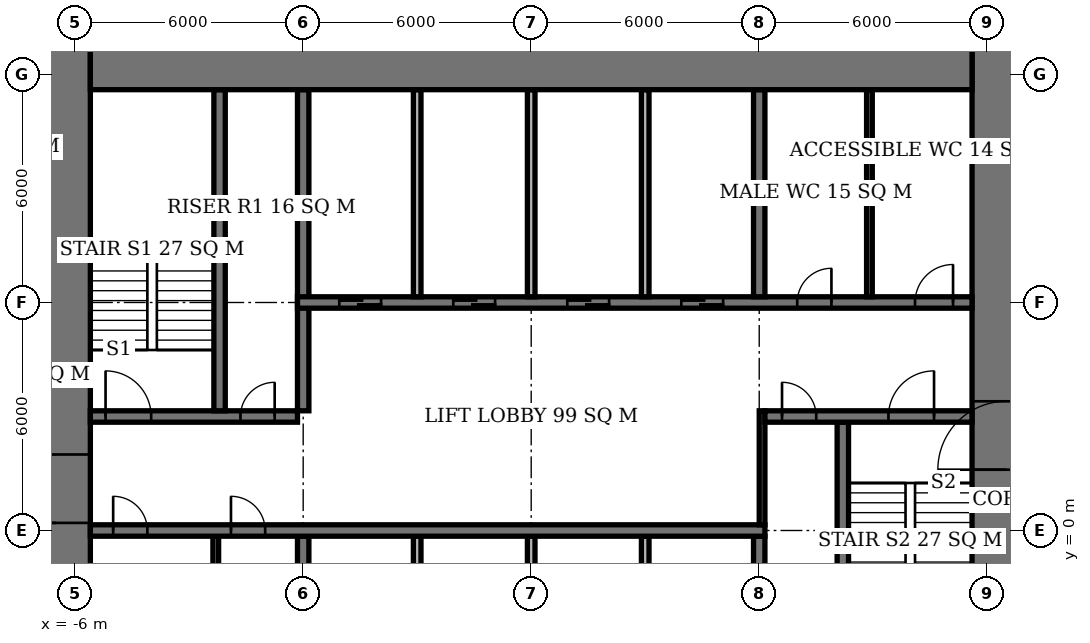
"""IFC4 building model, lengths in metres.
Left out: names, types, materials, properties, quantities, classifications, styles, units other than length and angle.
Written with IfcOpenShell. Run it as: python <this file> out.ifc"""

import sys

from ifc_helpers import new_model, si_unit, direction, frame, frame_2d, origin, place, context, subcontext, project, spatial, rectangle, extrude, element, fill, save


model = new_model("IFC4")
c1 = context("Model", 3, precision=1e-05, world=origin(), true_north=direction((0.0, 1.0)))
c2 = subcontext(c1, "Body", "Model", "MODEL_VIEW")
j1 = project(units=[si_unit("LENGTHUNIT", "METRE"), si_unit("PLANEANGLEUNIT", "RADIAN")], contexts=[c1])
p1 = place(None, origin())
s1 = spatial("IfcSite", under=j1, at=p1, CompositionType="ELEMENT")
p2 = place(p1, origin())
s2 = spatial("IfcBuilding", under=s1, at=p2, CompositionType="ELEMENT")
p3 = place(p2, frame((0.0, 0.0, 57.2)))
s3 = spatial("IfcBuildingStorey", under=s2, at=p3, CompositionType="ELEMENT", Elevation=57.2)
p4 = place(p3, frame((-5.6, 12.6, 0.0), z_axis=(0.0, 0.0, 1.0), x_axis=(1.0, 0.0, 0.0)))
e1 = element("IfcWall", 1, at=p4, inside=s3, PredefinedType="SHEAR", context=c2, shape_type="SweptSolid", body=[
    extrude(rectangle(XDim=23.2, YDim=2.0, at=frame_2d((11.6, 0.0))), origin(), (0.0, 0.0, 1.0), 3.9),
])
p5 = place(p3, frame((-6.5, -7.6, 0.0), z_axis=(0.0, 0.0, 1.0), x_axis=(0.0, 1.0, 0.0)))
e2 = element("IfcWall", 2, at=p5, inside=s3, PredefinedType="SHEAR", context=c2, shape_type="SweptSolid", body=[
    extrude(rectangle(XDim=21.2, YDim=1.8, at=frame_2d((10.6, 0.0))), origin(), (0.0, 0.0, 1.0), 3.9),
])
p6 = place(p5, frame((7.8, 0.0, 0.0)))
e3 = element("IfcOpeningElement", 3, at=p6, cuts=e2, PredefinedType="OPENING", context=c2, shape_type="SweptSolid", body=[
    extrude(rectangle(XDim=1.8, YDim=2.4, at=frame_2d((0.9, 1.2))), frame((0.0, 0.91, 0.0), z_axis=(0.0, -1.0, 0.0), x_axis=(1.0, 0.0, 0.0)), (0.0, 0.0, 1.0), 1.82),
])
p7 = place(p3, frame((18.5, -7.6, 0.0), z_axis=(0.0, 0.0, 1.0), x_axis=(0.0, 1.0, 0.0)))
e4 = element("IfcWall", 4, at=p7, inside=s3, PredefinedType="SHEAR", context=c2, shape_type="SweptSolid", body=[
    extrude(rectangle(XDim=21.2, YDim=1.8, at=frame_2d((10.6, 0.0))), origin(), (0.0, 0.0, 1.0), 3.9),
])
p8 = place(p7, frame((9.2, 0.0, 0.0)))
e5 = element("IfcOpeningElement", 5, at=p8, cuts=e4, PredefinedType="OPENING", context=c2, shape_type="SweptSolid", body=[
    extrude(rectangle(XDim=1.8, YDim=2.4, at=frame_2d((0.9, 1.2))), frame((0.0, 0.91, 0.0), z_axis=(0.0, -1.0, 0.0), x_axis=(1.0, 0.0, 0.0)), (0.0, 0.0, 1.0), 1.82),
])
p9 = place(p3, frame((-5.6, 0.0, 0.0), z_axis=(0.0, 0.0, 1.0), x_axis=(1.0, 0.0, 0.0)))
e6 = element("IfcWall", 6, at=p9, inside=s3, PredefinedType="SHEAR", context=c2, shape_type="SweptSolid", body=[
    extrude(rectangle(XDim=17.75, YDim=0.3, at=frame_2d((8.875, 0.0))), origin(), (0.0, 0.0, 1.0), 3.9),
])
p10 = place(p9, frame((0.6, 0.0, 0.0)))
e7 = element("IfcOpeningElement", 7, at=p10, cuts=e6, PredefinedType="OPENING", context=c2, shape_type="SweptSolid", body=[
    extrude(rectangle(XDim=0.9, YDim=2.1, at=frame_2d((0.45, 1.05))), frame((0.0, 0.16, 0.0), z_axis=(0.0, -1.0, 0.0), x_axis=(1.0, 0.0, 0.0)), (0.0, 0.0, 1.0), 0.32),
])
p11 = place(p9, frame((3.7, 0.0, 0.0)))
e8 = element("IfcOpeningElement", 8, at=p11, cuts=e6, PredefinedType="OPENING", context=c2, shape_type="SweptSolid", body=[
    extrude(rectangle(XDim=0.9, YDim=2.1, at=frame_2d((0.45, 1.05))), frame((0.0, 0.16, 0.0), z_axis=(0.0, -1.0, 0.0), x_axis=(1.0, 0.0, 0.0)), (0.0, 0.0, 1.0), 0.32),
])
p12 = place(p3, frame((-5.6, 3.0, 0.0), z_axis=(0.0, 0.0, 1.0), x_axis=(1.0, 0.0, 0.0)))
e9 = element("IfcWall", 9, at=p12, inside=s3, PredefinedType="SHEAR", context=c2, shape_type="SweptSolid", body=[
    extrude(rectangle(XDim=5.45, YDim=0.3, at=frame_2d((2.725, 0.0))), origin(), (0.0, 0.0, 1.0), 3.9),
])
p13 = place(p12, frame((0.4, 0.0, 0.0)))
e10 = element("IfcOpeningElement", 10, at=p13, cuts=e9, PredefinedType="OPENING", context=c2, shape_type="SweptSolid", body=[
    extrude(rectangle(XDim=1.2, YDim=2.1, at=frame_2d((0.6, 1.05))), frame((0.0, 0.16, 0.0), z_axis=(0.0, -1.0, 0.0), x_axis=(1.0, 0.0, 0.0)), (0.0, 0.0, 1.0), 0.32),
])
p14 = place(p12, frame((3.95, 0.0, 0.0)))
e11 = element("IfcOpeningElement", 11, at=p14, cuts=e9, PredefinedType="OPENING", context=c2, shape_type="SweptSolid", body=[
    extrude(rectangle(XDim=0.9, YDim=2.1, at=frame_2d((0.45, 1.05))), frame((0.0, 0.16, 0.0), z_axis=(0.0, -1.0, 0.0), x_axis=(1.0, 0.0, 0.0)), (0.0, 0.0, 1.0), 0.32),
])
p15 = place(p3, frame((12.15, 3.0, 0.0), z_axis=(0.0, 0.0, 1.0), x_axis=(1.0, 0.0, 0.0)))
e12 = element("IfcWall", 12, at=p15, inside=s3, PredefinedType="SHEAR", context=c2, shape_type="SweptSolid", body=[
    extrude(rectangle(XDim=5.45, YDim=0.3, at=frame_2d((2.725, 0.0))), origin(), (0.0, 0.0, 1.0), 3.9),
])
p16 = place(p15, frame((3.25, 0.0, 0.0)))
e13 = element("IfcOpeningElement", 13, at=p16, cuts=e12, PredefinedType="OPENING", context=c2, shape_type="SweptSolid", body=[
    extrude(rectangle(XDim=1.2, YDim=2.1, at=frame_2d((0.6, 1.05))), frame((0.0, 0.16, 0.0), z_axis=(0.0, -1.0, 0.0), x_axis=(1.0, 0.0, 0.0)), (0.0, 0.0, 1.0), 0.32),
])
p17 = place(p15, frame((0.45, 0.0, 0.0)))
e14 = element("IfcOpeningElement", 14, at=p17, cuts=e12, PredefinedType="OPENING", context=c2, shape_type="SweptSolid", body=[
    extrude(rectangle(XDim=0.9, YDim=2.1, at=frame_2d((0.45, 1.05))), frame((0.0, 0.16, 0.0), z_axis=(0.0, -1.0, 0.0), x_axis=(1.0, 0.0, 0.0)), (0.0, 0.0, 1.0), 0.32),
])
p18 = place(p3, frame((-0.15, 6.0, 0.0), z_axis=(0.0, 0.0, 1.0), x_axis=(1.0, 0.0, 0.0)))
e15 = element("IfcWall", 15, at=p18, inside=s3, PredefinedType="SHEAR", context=c2, shape_type="SweptSolid", body=[
    extrude(rectangle(XDim=17.75, YDim=0.3, at=frame_2d((8.875, 0.0))), origin(), (0.0, 0.0, 1.0), 3.9),
])
p19 = place(p18, frame((13.15, 0.0, 0.0)))
e16 = element("IfcOpeningElement", 16, at=p19, cuts=e15, PredefinedType="OPENING", context=c2, shape_type="SweptSolid", body=[
    extrude(rectangle(XDim=0.9, YDim=2.1, at=frame_2d((0.45, 1.05))), frame((0.0, 0.16, 0.0), z_axis=(0.0, -1.0, 0.0), x_axis=(1.0, 0.0, 0.0)), (0.0, 0.0, 1.0), 0.32),
])
p20 = place(p18, frame((16.25, 0.0, 0.0)))
e17 = element("IfcOpeningElement", 17, at=p20, cuts=e15, PredefinedType="OPENING", context=c2, shape_type="SweptSolid", body=[
    extrude(rectangle(XDim=1.0, YDim=2.1, at=frame_2d((0.5, 1.05))), frame((0.0, 0.16, 0.0), z_axis=(0.0, -1.0, 0.0), x_axis=(1.0, 0.0, 0.0)), (0.0, 0.0, 1.0), 0.32),
])
p21 = place(p18, frame((1.1, 0.0, 0.0)))
e18 = element("IfcOpeningElement", 18, at=p21, cuts=e15, PredefinedType="OPENING", context=c2, shape_type="SweptSolid", body=[
    extrude(rectangle(XDim=1.1, YDim=2.1, at=frame_2d((0.55, 1.05))), frame((0.0, 0.16, 0.0), z_axis=(0.0, -1.0, 0.0), x_axis=(1.0, 0.0, 0.0)), (0.0, 0.0, 1.0), 0.32),
])
p22 = place(p18, frame((4.1, 0.0, 0.0)))
e19 = element("IfcOpeningElement", 19, at=p22, cuts=e15, PredefinedType="OPENING", context=c2, shape_type="SweptSolid", body=[
    extrude(rectangle(XDim=1.1, YDim=2.1, at=frame_2d((0.55, 1.05))), frame((0.0, 0.16, 0.0), z_axis=(0.0, -1.0, 0.0), x_axis=(1.0, 0.0, 0.0)), (0.0, 0.0, 1.0), 0.32),
])
p23 = place(p18, frame((7.1, 0.0, 0.0)))
e20 = element("IfcOpeningElement", 20, at=p23, cuts=e15, PredefinedType="OPENING", context=c2, shape_type="SweptSolid", body=[
    extrude(rectangle(XDim=1.1, YDim=2.1, at=frame_2d((0.55, 1.05))), frame((0.0, 0.16, 0.0), z_axis=(0.0, -1.0, 0.0), x_axis=(1.0, 0.0, 0.0)), (0.0, 0.0, 1.0), 0.32),
])
p24 = place(p18, frame((10.1, 0.0, 0.0)))
e21 = element("IfcOpeningElement", 21, at=p24, cuts=e15, PredefinedType="OPENING", context=c2, shape_type="SweptSolid", body=[
    extrude(rectangle(XDim=1.1, YDim=2.1, at=frame_2d((0.55, 1.05))), frame((0.0, 0.16, 0.0), z_axis=(0.0, -1.0, 0.0), x_axis=(1.0, 0.0, 0.0)), (0.0, 0.0, 1.0), 0.32),
])
p25 = place(p3, frame((0.0, -5.6, 0.0), z_axis=(0.0, 0.0, 1.0), x_axis=(0.0, 1.0, 0.0)))
e22 = element("IfcWall", 22, at=p25, inside=s3, PredefinedType="SHEAR", context=c2, shape_type="SweptSolid", body=[
    extrude(rectangle(XDim=5.45, YDim=0.3, at=frame_2d((2.725, 0.0))), origin(), (0.0, 0.0, 1.0), 3.9),
])
p26 = place(p3, frame((0.0, 3.15, 0.0), z_axis=(0.0, 0.0, 1.0), x_axis=(0.0, 1.0, 0.0)))
e23 = element("IfcWall", 23, at=p26, inside=s3, PredefinedType="SHEAR", context=c2, shape_type="SweptSolid", body=[
    extrude(rectangle(XDim=8.45, YDim=0.3, at=frame_2d((4.225, 0.0))), origin(), (0.0, 0.0, 1.0), 3.9),
])
for number, where, z_axis, x_axis in (
    (24, (12.0, -5.6, 0.0), (0.0, 0.0, 1.0), (0.0, 1.0, 0.0)),
    (25, (12.0, 6.15, 0.0), (0.0, 0.0, 1.0), (0.0, 1.0, 0.0)),
):
    element("IfcWall", number, at=place(p3, frame(where, z_axis=z_axis, x_axis=x_axis)), inside=s3, PredefinedType="SHEAR", context=c2, shape_type="SweptSolid", body=[
        extrude(rectangle(XDim=5.45, YDim=0.3, at=frame_2d((2.725, 0.0))), origin(), (0.0, 0.0, 1.0), 3.9),
    ])
for number, where, z_axis, x_axis in (
    (26, (-2.2, 3.15, 0.0), (0.0, 0.0, 1.0), (0.0, 1.0, 0.0)),
    (27, (14.2, -5.6, 0.0), (0.0, 0.0, 1.0), (0.0, 1.0, 0.0)),
):
    element("IfcWall", number, at=place(p3, frame(where, z_axis=z_axis, x_axis=x_axis)), inside=s3, PredefinedType="SHEAR", context=c2, shape_type="SweptSolid", body=[
        extrude(rectangle(XDim=8.45, YDim=0.3, at=frame_2d((4.225, 0.0))), origin(), (0.0, 0.0, 1.0), 3.9),
    ])
for number, where, z_axis, x_axis in (
    (28, (3.0, 6.15, 0.0), (0.0, 0.0, 1.0), (0.0, 1.0, 0.0)),
    (29, (6.0, 6.15, 0.0), (0.0, 0.0, 1.0), (0.0, 1.0, 0.0)),
    (30, (9.0, 6.15, 0.0), (0.0, 0.0, 1.0), (0.0, 1.0, 0.0)),
    (31, (3.0, -5.6, 0.0), (0.0, 0.0, 1.0), (0.0, 1.0, 0.0)),
    (32, (6.0, -5.6, 0.0), (0.0, 0.0, 1.0), (0.0, 1.0, 0.0)),
    (33, (9.0, -5.6, 0.0), (0.0, 0.0, 1.0), (0.0, 1.0, 0.0)),
):
    element("IfcWall", number, at=place(p3, frame(where, z_axis=z_axis, x_axis=x_axis)), inside=s3, PredefinedType="SOLIDWALL", context=c2, shape_type="SweptSolid", body=[
        extrude(rectangle(XDim=5.45, YDim=0.2, at=frame_2d((2.725, 0.0))), origin(), (0.0, 0.0, 1.0), 3.9),
    ])
for number, where, z_axis, x_axis in (
    (34, (-2.3, -5.6, 0.0), (0.0, 0.0, 1.0), (0.0, 1.0, 0.0)),
    (35, (14.9, 6.15, 0.0), (0.0, 0.0, 1.0), (0.0, 1.0, 0.0)),
):
    element("IfcWall", number, at=place(p3, frame(where, z_axis=z_axis, x_axis=x_axis)), inside=s3, PredefinedType="PLUMBINGWALL", context=c2, shape_type="SweptSolid", body=[
        extrude(rectangle(XDim=5.45, YDim=0.15, at=frame_2d((2.725, 0.0))), origin(), (0.0, 0.0, 1.0), 3.65),
    ])
p27 = place(p3, frame((12.075, 0.15, 0.0), z_axis=(0.0, 0.0, 1.0), x_axis=(0.0, 1.0, 0.0)))
e36 = element("IfcWall", 36, at=p27, inside=s3, PredefinedType="PARTITIONING", context=c2, shape_type="SweptSolid", body=[
    extrude(rectangle(XDim=3.0, YDim=0.15, at=frame_2d((1.5, 0.0))), origin(), (0.0, 0.0, 1.0), 3.65),
])
p28 = place(p6, origin())
e37 = element("IfcDoor", 37, at=p28, inside=s3, OperationType="DOUBLE_DOOR_SINGLE_SWING", PredefinedType="DOOR", context=c2, shape_type="SweptSolid", body=[
    extrude(rectangle(XDim=1.8, YDim=2.4, at=frame_2d((0.9, 1.2))), frame((0.0, 0.025, 0.0), z_axis=(0.0, -1.0, 0.0), x_axis=(1.0, 0.0, 0.0)), (0.0, 0.0, 1.0), 0.05),
])
fill(e3, e37)
p29 = place(p8, origin())
e38 = element("IfcDoor", 38, at=p29, inside=s3, OperationType="DOUBLE_DOOR_SINGLE_SWING", PredefinedType="DOOR", context=c2, shape_type="SweptSolid", body=[
    extrude(rectangle(XDim=1.8, YDim=2.4, at=frame_2d((0.9, 1.2))), frame((0.0, 0.025, 0.0), z_axis=(0.0, -1.0, 0.0), x_axis=(1.0, 0.0, 0.0)), (0.0, 0.0, 1.0), 0.05),
])
fill(e5, e38)
p30 = place(p13, origin())
e39 = element("IfcDoor", 39, at=p30, inside=s3, OperationType="SINGLE_SWING_LEFT", PredefinedType="DOOR", context=c2, shape_type="SweptSolid", body=[
    extrude(rectangle(XDim=1.2, YDim=2.1, at=frame_2d((0.6, 1.05))), frame((0.0, 0.025, 0.0), z_axis=(0.0, -1.0, 0.0), x_axis=(1.0, 0.0, 0.0)), (0.0, 0.0, 1.0), 0.05),
])
fill(e10, e39)
p31 = place(p14, origin())
e40 = element("IfcDoor", 40, at=p31, inside=s3, OperationType="SINGLE_SWING_RIGHT", PredefinedType="DOOR", context=c2, shape_type="SweptSolid", body=[
    extrude(rectangle(XDim=0.9, YDim=2.1, at=frame_2d((0.45, 1.05))), frame((0.0, 0.025, 0.0), z_axis=(0.0, -1.0, 0.0), x_axis=(1.0, 0.0, 0.0)), (0.0, 0.0, 1.0), 0.05),
])
fill(e11, e40)
p32 = place(p16, origin())
e41 = element("IfcDoor", 41, at=p32, inside=s3, OperationType="SINGLE_SWING_RIGHT", PredefinedType="DOOR", context=c2, shape_type="SweptSolid", body=[
    extrude(rectangle(XDim=1.2, YDim=2.1, at=frame_2d((0.6, 1.05))), frame((0.0, 0.025, 0.0), z_axis=(0.0, -1.0, 0.0), x_axis=(1.0, 0.0, 0.0)), (0.0, 0.0, 1.0), 0.05),
])
fill(e13, e41)
p33 = place(p17, origin())
e42 = element("IfcDoor", 42, at=p33, inside=s3, OperationType="SINGLE_SWING_LEFT", PredefinedType="DOOR", context=c2, shape_type="SweptSolid", body=[
    extrude(rectangle(XDim=0.9, YDim=2.1, at=frame_2d((0.45, 1.05))), frame((0.0, 0.025, 0.0), z_axis=(0.0, -1.0, 0.0), x_axis=(1.0, 0.0, 0.0)), (0.0, 0.0, 1.0), 0.05),
])
fill(e14, e42)
p34 = place(p10, origin())
e43 = element("IfcDoor", 43, at=p34, inside=s3, OperationType="SINGLE_SWING_LEFT", PredefinedType="DOOR", context=c2, shape_type="SweptSolid", body=[
    extrude(rectangle(XDim=0.9, YDim=2.1, at=frame_2d((0.45, 1.05))), frame((0.0, 0.025, 0.0), z_axis=(0.0, -1.0, 0.0), x_axis=(1.0, 0.0, 0.0)), (0.0, 0.0, 1.0), 0.05),
])
fill(e7, e43)
p35 = place(p11, origin())
e44 = element("IfcDoor", 44, at=p35, inside=s3, OperationType="SINGLE_SWING_LEFT", PredefinedType="DOOR", context=c2, shape_type="SweptSolid", body=[
    extrude(rectangle(XDim=0.9, YDim=2.1, at=frame_2d((0.45, 1.05))), frame((0.0, 0.025, 0.0), z_axis=(0.0, -1.0, 0.0), x_axis=(1.0, 0.0, 0.0)), (0.0, 0.0, 1.0), 0.05),
])
fill(e8, e44)
p36 = place(p19, origin())
e45 = element("IfcDoor", 45, at=p36, inside=s3, OperationType="SINGLE_SWING_RIGHT", PredefinedType="DOOR", context=c2, shape_type="SweptSolid", body=[
    extrude(rectangle(XDim=0.9, YDim=2.1, at=frame_2d((0.45, 1.05))), frame((0.0, 0.025, 0.0), z_axis=(0.0, -1.0, 0.0), x_axis=(1.0, 0.0, 0.0)), (0.0, 0.0, 1.0), 0.05),
])
fill(e16, e45)
p37 = place(p20, origin())
e46 = element("IfcDoor", 46, at=p37, inside=s3, OperationType="SINGLE_SWING_RIGHT", PredefinedType="DOOR", context=c2, shape_type="SweptSolid", body=[
    extrude(rectangle(XDim=1.0, YDim=2.1, at=frame_2d((0.5, 1.05))), frame((0.0, 0.025, 0.0), z_axis=(0.0, -1.0, 0.0), x_axis=(1.0, 0.0, 0.0)), (0.0, 0.0, 1.0), 0.05),
])
fill(e17, e46)
p38 = place(p21, origin())
e47 = element("IfcDoor", 47, at=p38, inside=s3, OperationType="DOUBLE_DOOR_SLIDING", PredefinedType="USERDEFINED", context=c2, shape_type="SweptSolid", body=[
    extrude(rectangle(XDim=1.1, YDim=2.1, at=frame_2d((0.55, 1.05))), frame((0.0, 0.025, 0.0), z_axis=(0.0, -1.0, 0.0), x_axis=(1.0, 0.0, 0.0)), (0.0, 0.0, 1.0), 0.05),
])
fill(e18, e47)
p39 = place(p22, origin())
e48 = element("IfcDoor", 48, at=p39, inside=s3, OperationType="DOUBLE_DOOR_SLIDING", PredefinedType="USERDEFINED", context=c2, shape_type="SweptSolid", body=[
    extrude(rectangle(XDim=1.1, YDim=2.1, at=frame_2d((0.55, 1.05))), frame((0.0, 0.025, 0.0), z_axis=(0.0, -1.0, 0.0), x_axis=(1.0, 0.0, 0.0)), (0.0, 0.0, 1.0), 0.05),
])
fill(e19, e48)
p40 = place(p23, origin())
e49 = element("IfcDoor", 49, at=p40, inside=s3, OperationType="DOUBLE_DOOR_SLIDING", PredefinedType="USERDEFINED", context=c2, shape_type="SweptSolid", body=[
    extrude(rectangle(XDim=1.1, YDim=2.1, at=frame_2d((0.55, 1.05))), frame((0.0, 0.025, 0.0), z_axis=(0.0, -1.0, 0.0), x_axis=(1.0, 0.0, 0.0)), (0.0, 0.0, 1.0), 0.05),
])
fill(e20, e49)
p41 = place(p24, origin())
e50 = element("IfcDoor", 50, at=p41, inside=s3, OperationType="DOUBLE_DOOR_SLIDING", PredefinedType="USERDEFINED", context=c2, shape_type="SweptSolid", body=[
    extrude(rectangle(XDim=1.1, YDim=2.1, at=frame_2d((0.55, 1.05))), frame((0.0, 0.025, 0.0), z_axis=(0.0, -1.0, 0.0), x_axis=(1.0, 0.0, 0.0)), (0.0, 0.0, 1.0), 0.05),
])
fill(e21, e50)
save(model, sys.argv[1])
